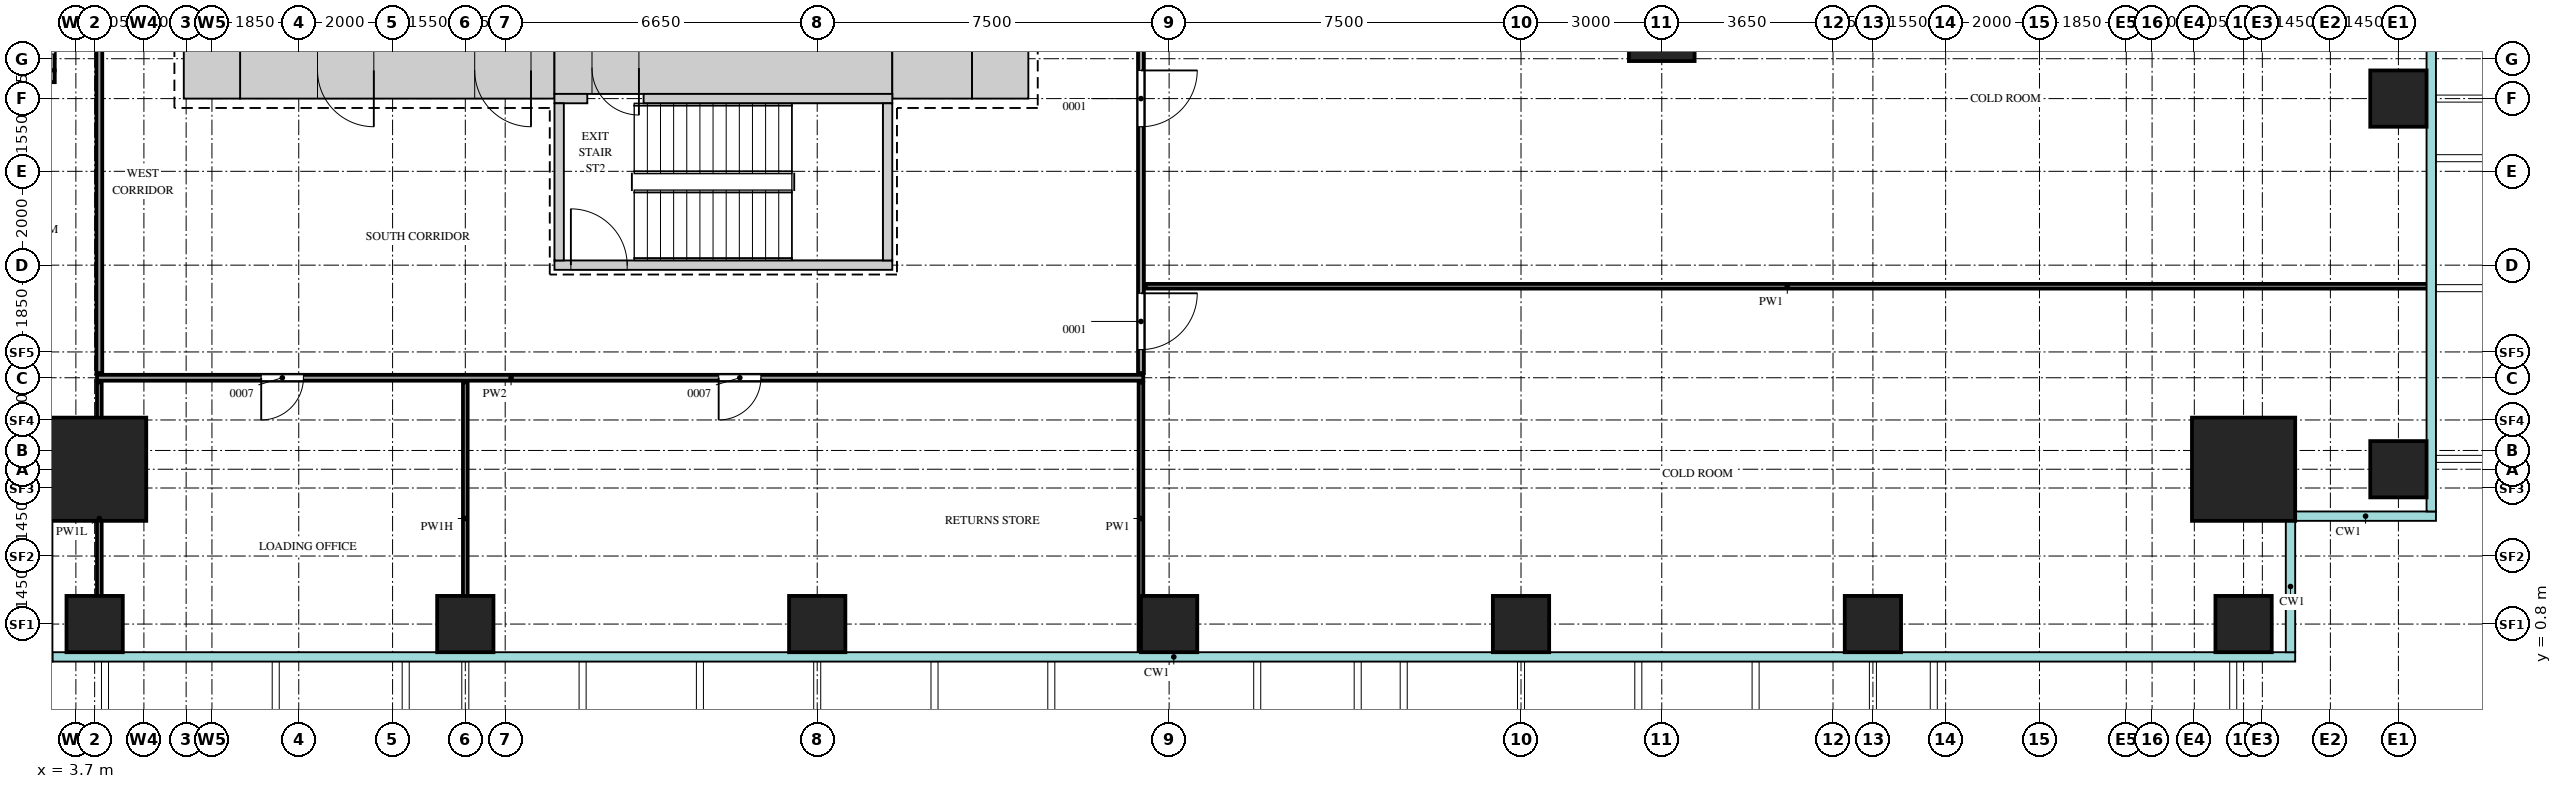
"""IFC4 building model, lengths in metres.
Left out: names, types, materials, properties, quantities, classifications, styles, units other than length and angle.
Written with IfcOpenShell. Run it as: python <this file> out.ifc"""

import sys

from ifc_helpers import new_model, si_unit, direction, frame, frame_2d, origin, origin_2d, place, context, subcontext, project, spatial, rectangle, extrude, source, transform, mapped, element, fill, save


model = new_model("IFC4")
c1 = context("Model", 3, precision=1e-05, world=origin(), true_north=direction((0.0, 1.0)))
c2 = subcontext(c1, "Body", "Model", "MODEL_VIEW")
j1 = project(units=[si_unit("LENGTHUNIT", "METRE"), si_unit("PLANEANGLEUNIT", "RADIAN")], contexts=[c1])
p1 = place(None, origin())
s1 = spatial("IfcSite", under=j1, at=p1, CompositionType="ELEMENT")
p2 = place(p1, origin())
s2 = spatial("IfcBuilding", under=s1, at=p2, CompositionType="ELEMENT")
p3 = place(p2, frame((0.0, 0.0, 87.0)))
s3 = spatial("IfcBuildingStorey", under=s2, at=p3, CompositionType="ELEMENT", Elevation=87.0)
m1 = source(origin(), c2, "Body", "SweptSolid", [
    extrude(rectangle(XDim=6.7, YDim=1.2, at=frame_2d((3.35, 0.0))), origin(), (0.0, 0.0, 1.0), 4.2),
])
p4 = place(p3, frame((7.2, 12.6, 0.0), z_axis=(0.0, 0.0, 1.0), x_axis=(1.0, 0.0, 0.0)))
e1 = element("IfcWall", 1, at=p4, inside=s3, PredefinedType="SHEAR", context=c2, shape_type="MappedRepresentation", body=[
    mapped(m1, transform((0.0, 0.0, 0.0))),
])
m2 = source(origin(), c2, "Body", "SweptSolid", [
    extrude(rectangle(XDim=1.2, YDim=2.1, at=frame_2d((0.6, 1.05))), frame((0.0, 0.61, 0.0), z_axis=(0.0, -1.0, 0.0), x_axis=(1.0, 0.0, 0.0)), (0.0, 0.0, 1.0), 1.22),
])
p5 = place(p4, frame((5.0, 0.0, 0.0)))
e2 = element("IfcOpeningElement", 2, at=p5, cuts=e1, PredefinedType="OPENING", context=c2, shape_type="MappedRepresentation", body=[
    mapped(m2, transform((0.0, 0.0, 0.0))),
])
p6 = place(p4, frame((1.65, 0.0, 0.0)))
e3 = element("IfcOpeningElement", 3, at=p6, cuts=e1, PredefinedType="OPENING", context=c2, shape_type="MappedRepresentation", body=[
    mapped(m2, transform((0.0, 0.0, 0.0))),
])
m3 = source(origin(), c2, "Body", "SweptSolid", [
    extrude(rectangle(XDim=7.2, YDim=1.1, at=frame_2d((3.6, 0.0))), origin(), (0.0, 0.0, 1.0), 4.2),
])
p7 = place(p3, frame((13.9, 12.65, 0.0), z_axis=(0.0, 0.0, 1.0), x_axis=(1.0, 0.0, 0.0)))
e4 = element("IfcWall", 4, at=p7, inside=s3, PredefinedType="SHEAR", context=c2, shape_type="MappedRepresentation", body=[
    mapped(m3, transform((0.0, 0.0, 0.0))),
])
m4 = source(origin(), c2, "Body", "SweptSolid", [
    extrude(rectangle(XDim=1.0, YDim=2.1, at=frame_2d((0.5, 1.05))), frame((0.0, 0.56, 0.0), z_axis=(0.0, -1.0, 0.0), x_axis=(1.0, 0.0, 0.0)), (0.0, 0.0, 1.0), 1.12),
])
p8 = place(p7, frame((0.8, 0.0, 0.0)))
e5 = element("IfcOpeningElement", 5, at=p8, cuts=e4, PredefinedType="OPENING", context=c2, shape_type="MappedRepresentation", body=[
    mapped(m4, transform((0.0, 0.0, 0.0))),
])
m5 = source(origin(), c2, "Body", "SweptSolid", [
    extrude(rectangle(XDim=1.7, YDim=1.2, at=frame_2d((0.85, 0.0))), origin(), (0.0, 0.0, 1.0), 4.2),
])
p9 = place(p3, frame((21.1, 12.6, 0.0), z_axis=(0.0, 0.0, 1.0), x_axis=(1.0, 0.0, 0.0)))
e6 = element("IfcWall", 6, at=p9, inside=s3, PredefinedType="SHEAR", context=c2, shape_type="MappedRepresentation", body=[
    mapped(m5, transform((0.0, 0.0, 0.0))),
])
m6 = source(origin(), c2, "Body", "SweptSolid", [
    extrude(rectangle(XDim=1.2, YDim=1.2, at=frame_2d((0.6, 0.0))), origin(), (0.0, 0.0, 1.0), 4.2),
])
for number, where, z_axis, x_axis in (
    (7, (22.8, 12.6, 0.0), (0.0, 0.0, 1.0), (1.0, 0.0, 0.0)),
    (8, (6.0, 12.6, 0.0), (0.0, 0.0, 1.0), (1.0, 0.0, 0.0)),
):
    element("IfcWall", number, at=place(p3, frame(where, z_axis=z_axis, x_axis=x_axis)), inside=s3, PredefinedType="SHEAR", context=c2, shape_type="MappedRepresentation", body=[
        mapped(m6, transform((0.0, 0.0, 0.0))),
    ])
m7 = source(origin(), c2, "Body", "SweptSolid", [
    extrude(rectangle(XDim=0.7, YDim=0.2, at=frame_2d((0.35, 0.0))), origin(), (0.0, 0.0, 1.0), 4.2),
])
p10 = place(p3, frame((13.9, 12.0, 0.0), z_axis=(0.0, 0.0, 1.0), x_axis=(1.0, 0.0, 0.0)))
e9 = element("IfcWall", 9, at=p10, inside=s3, PredefinedType="SHEAR", context=c2, shape_type="MappedRepresentation", body=[
    mapped(m7, transform((0.0, 0.0, 0.0))),
])
m8 = source(origin(), c2, "Body", "SweptSolid", [
    extrude(rectangle(XDim=5.3, YDim=0.2, at=frame_2d((2.65, 0.0))), origin(), (0.0, 0.0, 1.0), 4.2),
])
p11 = place(p3, frame((15.8, 12.0, 0.0), z_axis=(0.0, 0.0, 1.0), x_axis=(1.0, 0.0, 0.0)))
e10 = element("IfcWall", 10, at=p11, inside=s3, PredefinedType="SHEAR", context=c2, shape_type="MappedRepresentation", body=[
    mapped(m8, transform((0.0, 0.0, 0.0))),
])
m9 = source(origin(), c2, "Body", "SweptSolid", [
    extrude(rectangle(XDim=7.2, YDim=0.2, at=frame_2d((3.6, 0.0))), origin(), (0.0, 0.0, 1.0), 4.2),
])
p12 = place(p3, frame((13.9, 8.45, 0.0), z_axis=(0.0, 0.0, 1.0), x_axis=(1.0, 0.0, 0.0)))
e11 = element("IfcWall", 11, at=p12, inside=s3, PredefinedType="SHEAR", context=c2, shape_type="MappedRepresentation", body=[
    mapped(m9, transform((0.0, 0.0, 0.0))),
])
m10 = source(origin(), c2, "Body", "SweptSolid", [
    extrude(rectangle(XDim=1.2, YDim=2.1, at=frame_2d((0.6, 1.05))), frame((0.0, 0.11, 0.0), z_axis=(0.0, -1.0, 0.0), x_axis=(1.0, 0.0, 0.0)), (0.0, 0.0, 1.0), 0.22),
])
p13 = place(p12, frame((0.35, 0.0, 0.0)))
e12 = element("IfcOpeningElement", 12, at=p13, cuts=e11, PredefinedType="OPENING", context=c2, shape_type="MappedRepresentation", body=[
    mapped(m10, transform((0.0, 0.0, 0.0))),
])
m11 = source(origin(), c2, "Body", "SweptSolid", [
    extrude(rectangle(XDim=3.35, YDim=0.2, at=frame_2d((1.675, 0.0))), origin(), (0.0, 0.0, 1.0), 4.2),
])
for number, where, z_axis, x_axis in (
    (13, (21.0, 8.55, 0.0), (0.0, 0.0, 1.0), (0.0, 1.0, 0.0)),
    (14, (14.0, 8.55, 0.0), (0.0, 0.0, 1.0), (0.0, 1.0, 0.0)),
):
    element("IfcWall", number, at=place(p3, frame(where, z_axis=z_axis, x_axis=x_axis)), inside=s3, PredefinedType="SHEAR", context=c2, shape_type="MappedRepresentation", body=[
        mapped(m11, transform((0.0, 0.0, 0.0))),
    ])
m12 = source(origin(), c2, "Body", "SweptSolid", [
    extrude(rectangle(XDim=2.2, YDim=2.2, at=origin_2d()), origin(), (0.0, 0.0, 1.0), 4.5),
])
for number, where, z_axis, x_axis in (
    (15, (49.9, 4.1, 0.0), (0.0, 0.0, 1.0), (1.0, 0.0, 0.0)),
    (16, (4.1, 4.1, 0.0), (0.0, 0.0, 1.0), (1.0, 0.0, 0.0)),
):
    element("IfcColumn", number, at=place(p3, frame(where, z_axis=z_axis, x_axis=x_axis)), inside=s3, PredefinedType="COLUMN", context=c2, shape_type="MappedRepresentation", body=[
        mapped(m12, transform((0.0, 0.0, 0.0))),
    ])
m13 = source(origin(), c2, "Body", "SweptSolid", [
    extrude(rectangle(XDim=1.2, YDim=1.2, at=origin_2d()), origin(), (0.0, 0.0, 1.0), 4.2),
])
for number, where, z_axis, x_axis in (
    (17, (4.1, 0.8, 0.0), (0.0, 0.0, 1.0), (1.0, 0.0, 0.0)),
    (18, (12.0, 0.8, 0.0), (0.0, 0.0, 1.0), (1.0, 0.0, 0.0)),
    (19, (19.5, 0.8, 0.0), (0.0, 0.0, 1.0), (1.0, 0.0, 0.0)),
    (20, (27.0, 0.8, 0.0), (0.0, 0.0, 1.0), (1.0, 0.0, 0.0)),
    (21, (34.5, 0.8, 0.0), (0.0, 0.0, 1.0), (1.0, 0.0, 0.0)),
    (22, (42.0, 0.8, 0.0), (0.0, 0.0, 1.0), (1.0, 0.0, 0.0)),
    (23, (49.9, 0.8, 0.0), (0.0, 0.0, 1.0), (1.0, 0.0, 0.0)),
    (24, (53.2, 4.1, 0.0), (0.0, 0.0, 1.0), (1.0, 0.0, 0.0)),
    (25, (53.2, 12.0, 0.0), (0.0, 0.0, 1.0), (1.0, 0.0, 0.0)),
):
    element("IfcColumn", number, at=place(p3, frame(where, z_axis=z_axis, x_axis=x_axis)), inside=s3, PredefinedType="COLUMN", context=c2, shape_type="MappedRepresentation", body=[
        mapped(m13, transform((0.0, 0.0, 0.0))),
    ])
m14 = source(origin(), c2, "Body", "SweptSolid", [
    extrude(rectangle(XDim=1.4, YDim=1.4, at=origin_2d()), origin(), (0.0, 0.0, 1.0), 4.2),
])
p14 = place(p3, frame((37.5, 13.5, 0.0), z_axis=(0.0, 0.0, 1.0), x_axis=(1.0, 0.0, 0.0)))
e26 = element("IfcColumn", 26, at=p14, inside=s3, PredefinedType="COLUMN", context=c2, shape_type="MappedRepresentation", body=[
    mapped(m14, transform((0.0, 0.0, 0.0))),
])
m15 = source(origin(), c2, "Body", "SweptSolid", [
    extrude(rectangle(XDim=6.3, YDim=0.25, at=frame_2d((3.15, 0.0))), origin(), (0.0, 0.0, 1.0), 4.2),
])
p15 = place(p3, frame((3.125, 12.6, 0.0), z_axis=(0.0, 0.0, 1.0), x_axis=(0.0, 1.0, 0.0)))
e27 = element("IfcWall", 27, at=p15, inside=s3, PredefinedType="SOLIDWALL", context=c2, shape_type="MappedRepresentation", body=[
    mapped(m15, transform((0.0, 0.0, 0.0))),
])
m16 = source(origin(), c2, "Body", "SweptSolid", [
    extrude(rectangle(XDim=1.6, YDim=2.4, at=frame_2d((0.8, 1.2))), frame((0.0, 0.135, 0.0), z_axis=(0.0, -1.0, 0.0), x_axis=(1.0, 0.0, 0.0)), (0.0, 0.0, 1.0), 0.27),
])
p16 = place(p15, frame((0.35, 0.0, 0.0)))
e28 = element("IfcOpeningElement", 28, at=p16, cuts=e27, PredefinedType="OPENING", context=c2, shape_type="MappedRepresentation", body=[
    mapped(m16, transform((0.0, 0.0, 0.0))),
])
p17 = place(p15, frame((4.35, 0.0, 0.0)))
e29 = element("IfcOpeningElement", 29, at=p17, cuts=e27, PredefinedType="OPENING", context=c2, shape_type="MappedRepresentation", body=[
    mapped(m16, transform((0.0, 0.0, 0.0))),
])
m17 = source(origin(), c2, "Body", "SweptSolid", [
    extrude(rectangle(XDim=1.8, YDim=2.4, at=frame_2d((0.9, 1.2))), frame((0.0, 0.135, 0.0), z_axis=(0.0, -1.0, 0.0), x_axis=(1.0, 0.0, 0.0)), (0.0, 0.0, 1.0), 0.27),
])
p18 = place(p15, frame((2.25, 0.0, 0.0)))
e30 = element("IfcOpeningElement", 30, at=p18, cuts=e27, PredefinedType="OPENING", context=c2, shape_type="MappedRepresentation", body=[
    mapped(m17, transform((0.0, 0.0, 0.0))),
])
m18 = source(origin(), c2, "Body", "SweptSolid", [
    extrude(rectangle(XDim=1.85, YDim=0.25, at=frame_2d((0.925, 0.0))), origin(), (0.0, 0.0, 1.0), 3.9),
])
p19 = place(p3, frame((1.4, 12.475, 0.0), z_axis=(0.0, 0.0, 1.0), x_axis=(1.0, 0.0, 0.0)))
e31 = element("IfcWall", 31, at=p19, inside=s3, PredefinedType="SOLIDWALL", context=c2, shape_type="MappedRepresentation", body=[
    mapped(m18, transform((0.0, 0.0, 0.0))),
])
m19 = source(origin(), c2, "Body", "SweptSolid", [
    extrude(rectangle(XDim=5.8, YDim=0.1, at=frame_2d((2.9, 0.0))), origin(), (0.0, 0.0, 1.0), 3.6),
])
p20 = place(p3, frame((4.2, 0.15, 0.0), z_axis=(0.0, 0.0, 1.0), x_axis=(0.0, 1.0, 0.0)))
e32 = element("IfcWall", 32, at=p20, inside=s3, PredefinedType="PARTITIONING", context=c2, shape_type="MappedRepresentation", body=[
    mapped(m19, transform((0.0, 0.0, 0.0))),
])
m20 = source(origin(), c2, "Body", "SweptSolid", [
    extrude(rectangle(XDim=5.8, YDim=0.1, at=frame_2d((2.9, 0.0))), origin(), (0.0, 0.0, 1.0), 3.7),
])
p21 = place(p3, frame((12.0, 0.15, 0.0), z_axis=(0.0, 0.0, 1.0), x_axis=(0.0, 1.0, 0.0)))
e33 = element("IfcWall", 33, at=p21, inside=s3, PredefinedType="PARTITIONING", context=c2, shape_type="MappedRepresentation", body=[
    mapped(m20, transform((0.0, 0.0, 0.0))),
])
m21 = source(origin(), c2, "Body", "SweptSolid", [
    extrude(rectangle(XDim=5.8, YDim=0.1, at=frame_2d((2.9, 0.0))), origin(), (0.0, 0.0, 1.0), 4.3),
])
p22 = place(p3, frame((26.4, 0.15, 0.0), z_axis=(0.0, 0.0, 1.0), x_axis=(0.0, 1.0, 0.0)))
e34 = element("IfcWall", 34, at=p22, inside=s3, PredefinedType="PARTITIONING", context=c2, shape_type="MappedRepresentation", body=[
    mapped(m21, transform((0.0, 0.0, 0.0))),
])
m22 = source(origin(), c2, "Body", "SweptSolid", [
    extrude(rectangle(XDim=22.3, YDim=0.125, at=frame_2d((11.15, 0.0))), origin(), (0.0, 0.0, 1.0), 4.3),
])
p23 = place(p3, frame((4.15, 6.05, 0.0), z_axis=(0.0, 0.0, 1.0), x_axis=(1.0, 0.0, 0.0)))
e35 = element("IfcWall", 35, at=p23, inside=s3, PredefinedType="PARTITIONING", context=c2, shape_type="MappedRepresentation", body=[
    mapped(m22, transform((0.0, 0.0, 0.0))),
])
m23 = source(origin(), c2, "Body", "SweptSolid", [
    extrude(rectangle(XDim=0.9, YDim=2.1, at=frame_2d((0.45, 1.05))), frame((0.0, 0.073, 0.0), z_axis=(0.0, -1.0, 0.0), x_axis=(1.0, 0.0, 0.0)), (0.0, 0.0, 1.0), 0.145),
])
p24 = place(p23, frame((3.5, 0.0, 0.0)))
e36 = element("IfcOpeningElement", 36, at=p24, cuts=e35, PredefinedType="OPENING", context=c2, shape_type="MappedRepresentation", body=[
    mapped(m23, transform((0.0, 0.0, 0.0))),
])
p25 = place(p23, frame((13.25, 0.0, 0.0)))
e37 = element("IfcOpeningElement", 37, at=p25, cuts=e35, PredefinedType="OPENING", context=c2, shape_type="MappedRepresentation", body=[
    mapped(m23, transform((0.0, 0.0, 0.0))),
])
m24 = source(origin(), c2, "Body", "SweptSolid", [
    extrude(rectangle(XDim=41.8, YDim=0.125, at=frame_2d((20.9, 0.0))), origin(), (0.0, 0.0, 1.0), 4.3),
])
p26 = place(p3, frame((4.2, 6.15, 0.0), z_axis=(0.0, 0.0, 1.0), x_axis=(0.0, 1.0, 0.0)))
e38 = element("IfcWall", 38, at=p26, inside=s3, PredefinedType="PARTITIONING", context=c2, shape_type="MappedRepresentation", body=[
    mapped(m24, transform((0.0, 0.0, 0.0))),
])
m25 = source(origin(), c2, "Body", "SweptSolid", [
    extrude(rectangle(XDim=1.2, YDim=2.1, at=frame_2d((0.6, 1.05))), frame((0.0, 0.073, 0.0), z_axis=(0.0, -1.0, 0.0), x_axis=(1.0, 0.0, 0.0)), (0.0, 0.0, 1.0), 0.145),
])
p27 = place(p26, frame((7.45, 0.0, 0.0)))
e39 = element("IfcOpeningElement", 39, at=p27, cuts=e38, PredefinedType="OPENING", context=c2, shape_type="MappedRepresentation", body=[
    mapped(m25, transform((0.0, 0.0, 0.0))),
])
p28 = place(p26, frame((26.05, 0.0, 0.0)))
e40 = element("IfcOpeningElement", 40, at=p28, cuts=e38, PredefinedType="OPENING", context=c2, shape_type="MappedRepresentation", body=[
    mapped(m25, transform((0.0, 0.0, 0.0))),
])
m26 = source(origin(), c2, "Body", "SweptSolid", [
    extrude(rectangle(XDim=29.05, YDim=0.125, at=frame_2d((14.525, 0.0))), origin(), (0.0, 0.0, 1.0), 4.3),
])
p29 = place(p3, frame((26.4, 6.15, 0.0), z_axis=(0.0, 0.0, 1.0), x_axis=(0.0, 1.0, 0.0)))
e41 = element("IfcWall", 41, at=p29, inside=s3, PredefinedType="PARTITIONING", context=c2, shape_type="MappedRepresentation", body=[
    mapped(m26, transform((0.0, 0.0, 0.0))),
])
p30 = place(p29, frame((0.5, 0.0, 0.0)))
e42 = element("IfcOpeningElement", 42, at=p30, cuts=e41, PredefinedType="OPENING", context=c2, shape_type="MappedRepresentation", body=[
    mapped(m25, transform((0.0, 0.0, 0.0))),
])
p31 = place(p29, frame((5.25, 0.0, 0.0)))
e43 = element("IfcOpeningElement", 43, at=p31, cuts=e41, PredefinedType="OPENING", context=c2, shape_type="MappedRepresentation", body=[
    mapped(m25, transform((0.0, 0.0, 0.0))),
])
p32 = place(p29, frame((13.25, 0.0, 0.0)))
e44 = element("IfcOpeningElement", 44, at=p32, cuts=e41, PredefinedType="OPENING", context=c2, shape_type="MappedRepresentation", body=[
    mapped(m25, transform((0.0, 0.0, 0.0))),
])
m27 = source(origin(), c2, "Body", "SweptSolid", [
    extrude(rectangle(XDim=27.35, YDim=0.1, at=frame_2d((13.675, 0.0))), origin(), (0.0, 0.0, 1.0), 4.3),
])
p33 = place(p3, frame((26.5, 8.0, 0.0), z_axis=(0.0, 0.0, 1.0), x_axis=(1.0, 0.0, 0.0)))
e45 = element("IfcWall", 45, at=p33, inside=s3, PredefinedType="PARTITIONING", context=c2, shape_type="MappedRepresentation", body=[
    mapped(m27, transform((0.0, 0.0, 0.0))),
])
m28 = source(origin(), c2, "Body", "SweptSolid", [
    extrude(rectangle(XDim=1.2, YDim=2.1, at=frame_2d((0.6, 1.05))), frame((0.0, 0.55, 0.0), z_axis=(0.0, -1.0, 0.0), x_axis=(1.0, 0.0, 0.0)), (0.0, 0.0, 1.0), 1.1),
])
p34 = place(p5, origin())
e46 = element("IfcDoor", 46, at=p34, inside=s3, OperationType="SINGLE_SWING_RIGHT", PredefinedType="DOOR", context=c2, shape_type="MappedRepresentation", body=[
    mapped(m28, transform((0.0, 0.0, 0.0))),
])
fill(e2, e46)
p35 = place(p6, origin())
e47 = element("IfcDoor", 47, at=p35, inside=s3, OperationType="SINGLE_SWING_RIGHT", PredefinedType="DOOR", context=c2, shape_type="MappedRepresentation", body=[
    mapped(m28, transform((0.0, 0.0, 0.0))),
])
fill(e3, e47)
m29 = source(origin(), c2, "Body", "SweptSolid", [
    extrude(rectangle(XDim=1.0, YDim=2.1, at=frame_2d((0.5, 1.05))), frame((0.0, 0.5, 0.0), z_axis=(0.0, -1.0, 0.0), x_axis=(1.0, 0.0, 0.0)), (0.0, 0.0, 1.0), 1.0),
])
p36 = place(p8, origin())
e48 = element("IfcDoor", 48, at=p36, inside=s3, OperationType="SINGLE_SWING_RIGHT", PredefinedType="DOOR", context=c2, shape_type="MappedRepresentation", body=[
    mapped(m29, transform((0.0, 0.0, 0.0))),
])
fill(e5, e48)
m30 = source(origin(), c2, "Body", "SweptSolid", [
    extrude(rectangle(XDim=1.2, YDim=2.1, at=frame_2d((0.6, 1.05))), frame((0.0, 0.025, 0.0), z_axis=(0.0, -1.0, 0.0), x_axis=(1.0, 0.0, 0.0)), (0.0, 0.0, 1.0), 0.05),
])
p37 = place(p30, origin())
e49 = element("IfcDoor", 49, at=p37, inside=s3, OperationType="SINGLE_SWING_RIGHT", PredefinedType="DOOR", context=c2, shape_type="MappedRepresentation", body=[
    mapped(m30, transform((0.0, 0.0, 0.0))),
])
fill(e42, e49)
p38 = place(p31, origin())
e50 = element("IfcDoor", 50, at=p38, inside=s3, OperationType="SINGLE_SWING_RIGHT", PredefinedType="DOOR", context=c2, shape_type="MappedRepresentation", body=[
    mapped(m30, transform((0.0, 0.0, 0.0))),
])
fill(e43, e50)
m31 = source(origin(), c2, "Body", "SweptSolid", [
    extrude(rectangle(XDim=0.9, YDim=2.1, at=frame_2d((0.45, 1.05))), frame((0.0, 0.025, 0.0), z_axis=(0.0, -1.0, 0.0), x_axis=(1.0, 0.0, 0.0)), (0.0, 0.0, 1.0), 0.05),
])
p39 = place(p24, origin())
e51 = element("IfcDoor", 51, at=p39, inside=s3, OperationType="SINGLE_SWING_LEFT", PredefinedType="DOOR", context=c2, shape_type="MappedRepresentation", body=[
    mapped(m31, transform((0.0, 0.0, 0.0))),
])
fill(e36, e51)
p40 = place(p25, origin())
e52 = element("IfcDoor", 52, at=p40, inside=s3, OperationType="SINGLE_SWING_LEFT", PredefinedType="DOOR", context=c2, shape_type="MappedRepresentation", body=[
    mapped(m31, transform((0.0, 0.0, 0.0))),
])
fill(e37, e52)
p41 = place(p13, origin())
e53 = element("IfcDoor", 53, at=p41, inside=s3, OperationType="SINGLE_SWING_RIGHT", PredefinedType="DOOR", context=c2, shape_type="MappedRepresentation", body=[
    mapped(m30, transform((0.0, 0.0, 0.0))),
])
fill(e12, e53)
save(model, sys.argv[1])
